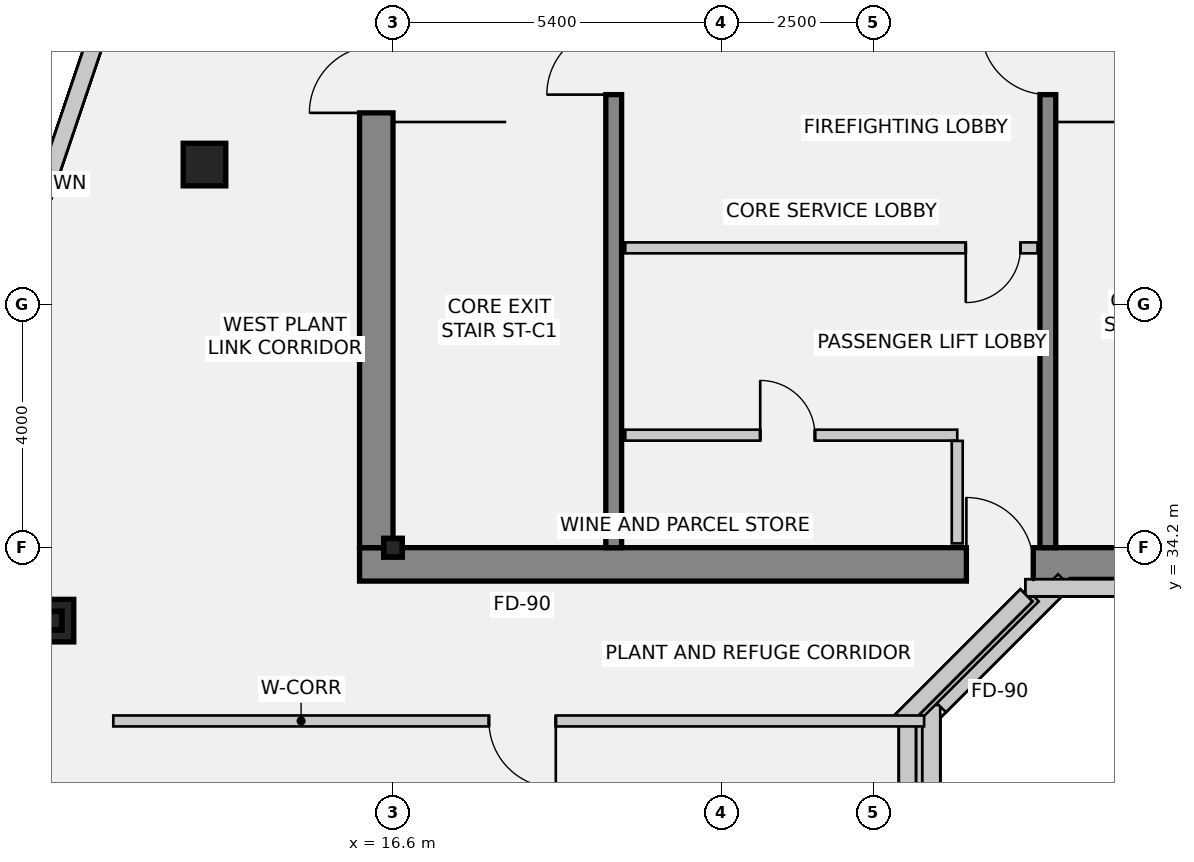
"""IFC4 building model, lengths in metres.
Left out: names, types, materials, properties, quantities, classifications, styles, units other than length and angle.
Written with IfcOpenShell. Run it as: python <this file> out.ifc"""

import sys

from ifc_helpers import new_model, si_unit, direction, frame, frame_2d, origin, origin_2d, place, context, subcontext, project, spatial, rectangle, hollow_rectangle, extrude, source, transform, mapped, element, fill, save


model = new_model("IFC4")
c1 = context("Model", 3, precision=1e-05, world=origin(), true_north=direction((0.0, 1.0)))
c2 = subcontext(c1, "Body", "Model", "MODEL_VIEW")
j1 = project(units=[si_unit("LENGTHUNIT", "METRE"), si_unit("PLANEANGLEUNIT", "RADIAN")], contexts=[c1])
p1 = place(None, origin())
s1 = spatial("IfcSite", under=j1, at=p1, CompositionType="ELEMENT")
p2 = place(p1, origin())
s2 = spatial("IfcBuilding", under=s1, at=p2, CompositionType="ELEMENT")
p3 = place(p2, frame((0.0, 0.0, 309.5)))
s3 = spatial("IfcBuildingStorey", under=s2, at=p3, CompositionType="ELEMENT", Elevation=309.5)
p4 = place(p3, frame((16.05, 33.925, 0.0), z_axis=(0.0, 0.0, 1.0), x_axis=(1.0, 0.0, 0.0)))
e1 = element("IfcWall", 1, at=p4, inside=s3, PredefinedType="SHEAR", context=c2, shape_type="SweptSolid", body=[
    extrude(rectangle(XDim=15.5, YDim=0.55, at=frame_2d((7.75, 0.0))), origin(), (0.0, 0.0, 1.0), 5.4),
])
m1 = source(origin(), c2, "Body", "SweptSolid", [
    extrude(rectangle(XDim=1.1, YDim=2.15, at=frame_2d((0.55, 1.075))), frame((0.0, 0.285, 0.0), z_axis=(0.0, -1.0, 0.0), x_axis=(1.0, 0.0, 0.0)), (0.0, 0.0, 1.0), 0.57),
])
p5 = place(p4, frame((9.98, 0.0, 0.0)))
e2 = element("IfcOpeningElement", 2, at=p5, cuts=e1, PredefinedType="OPENING", context=c2, shape_type="MappedRepresentation", body=[
    mapped(m1, transform((0.0, 0.0, 0.0), scale=1.0)),
])
p6 = place(p3, frame((16.325, 34.2, 0.0), z_axis=(0.0, 0.0, 1.0), x_axis=(0.0, 1.0, 0.0)))
e3 = element("IfcWall", 3, at=p6, inside=s3, PredefinedType="SHEAR", context=c2, shape_type="SweptSolid", body=[
    extrude(rectangle(XDim=11.4, YDim=0.55, at=frame_2d((5.7, 0.0))), origin(), (0.0, 0.0, 1.0), 5.4),
])
p7 = place(p6, frame((7.15, 0.0, 0.0)))
e4 = element("IfcOpeningElement", 4, at=p7, cuts=e3, PredefinedType="OPENING", context=c2, shape_type="MappedRepresentation", body=[
    mapped(m1, transform((0.0, 0.0, 0.0), scale=1.0)),
])
p8 = place(p3, frame((20.23, 34.2, 0.0), z_axis=(0.0, 0.0, 1.0), x_axis=(0.0, 1.0, 0.0)))
e5 = element("IfcWall", 5, at=p8, inside=s3, PredefinedType="SHEAR", context=c2, shape_type="SweptSolid", body=[
    extrude(rectangle(XDim=9.06, YDim=0.26, at=frame_2d((4.53, 0.0))), origin(), (0.0, 0.0, 1.0), 5.4),
])
m2 = source(origin(), c2, "Body", "SweptSolid", [
    extrude(rectangle(XDim=1.1, YDim=2.15, at=frame_2d((0.55, 1.075))), frame((0.0, 0.14, 0.0), z_axis=(0.0, -1.0, 0.0), x_axis=(1.0, 0.0, 0.0)), (0.0, 0.0, 1.0), 0.28),
])
p9 = place(p8, frame((7.45, 0.0, 0.0)))
e6 = element("IfcOpeningElement", 6, at=p9, cuts=e5, PredefinedType="OPENING", context=c2, shape_type="MappedRepresentation", body=[
    mapped(m2, transform((0.0, 0.0, 0.0), scale=1.0)),
])
p10 = place(p3, frame((27.37, 34.2, 0.0), z_axis=(0.0, 0.0, 1.0), x_axis=(0.0, 1.0, 0.0)))
e7 = element("IfcWall", 7, at=p10, inside=s3, PredefinedType="SHEAR", context=c2, shape_type="SweptSolid", body=[
    extrude(rectangle(XDim=9.06, YDim=0.26, at=frame_2d((4.53, 0.0))), origin(), (0.0, 0.0, 1.0), 5.4),
])
p11 = place(p10, frame((7.45, 0.0, 0.0)))
e8 = element("IfcOpeningElement", 8, at=p11, cuts=e7, PredefinedType="OPENING", context=c2, shape_type="MappedRepresentation", body=[
    mapped(m2, transform((0.0, 0.0, 0.0), scale=1.0)),
])
m3 = source(origin(), c2, "Body", "SweptSolid", [
    extrude(rectangle(XDim=0.7, YDim=0.7, at=origin_2d()), origin(), (0.0, 0.0, 1.0), 5.4),
])
for number, where, z_axis, x_axis in (
    (9, (11.0, 33.0, 0.0), (0.0, 0.0, 1.0), (1.0, 0.0, 0.0)),
    (10, (13.5, 40.5, 0.0), (0.0, 0.0, 1.0), (1.0, 0.0, 0.0)),
):
    element("IfcColumn", number, at=place(p3, frame(where, z_axis=z_axis, x_axis=x_axis)), inside=s3, PredefinedType="COLUMN", context=c2, shape_type="MappedRepresentation", body=[
        mapped(m3, transform((0.0, 0.0, 0.0), scale=1.0)),
    ])
m4 = source(origin(), c2, "Body", "SweptSolid", [
    extrude(hollow_rectangle(XDim=0.3, YDim=0.3, WallThickness=0.016, InnerFilletRadius=0.016, OuterFilletRadius=0.032, at=origin_2d()), origin(), (0.0, 0.0, 1.0), 3.684),
])
p12 = place(p3, frame((16.6, 34.2, 5.4), z_axis=(0.0, 0.0, 1.0), x_axis=(1.0, 0.0, 0.0)))
e11 = element("IfcColumn", 11, at=p12, inside=s3, PredefinedType="COLUMN", context=c2, shape_type="MappedRepresentation", body=[
    mapped(m4, transform((0.0, 0.0, 0.0), scale=1.0)),
])
m5 = source(origin(), c2, "Body", "SweptSolid", [
    extrude(hollow_rectangle(XDim=0.3, YDim=0.3, WallThickness=0.016, InnerFilletRadius=0.016, OuterFilletRadius=0.032, at=origin_2d()), origin(), (0.0, 0.0, 1.0), 3.513),
])
p13 = place(p3, frame((11.0, 33.0, 5.4), z_axis=(0.0, 0.0, 1.0), x_axis=(1.0, 0.0, 0.0)))
e12 = element("IfcColumn", 12, at=p13, inside=s3, PredefinedType="COLUMN", context=c2, shape_type="MappedRepresentation", body=[
    mapped(m5, transform((0.0, 0.0, 0.0), scale=1.0)),
])
m6 = source(origin(), c2, "Body", "SweptSolid", [
    extrude(hollow_rectangle(XDim=0.3, YDim=0.3, WallThickness=0.016, InnerFilletRadius=0.016, OuterFilletRadius=0.032, at=origin_2d()), origin(), (0.0, 0.0, 1.0), 4.485),
])
p14 = place(p3, frame((16.6, 34.2, 9.094), z_axis=(0.0, 0.0, 1.0), x_axis=(1.0, 0.0, 0.0)))
e13 = element("IfcColumn", 13, at=p14, inside=s3, PredefinedType="COLUMN", context=c2, shape_type="MappedRepresentation", body=[
    mapped(m6, transform((0.0, 0.0, 0.0), scale=1.0)),
])
m7 = source(origin(), c2, "Body", "SweptSolid", [
    extrude(hollow_rectangle(XDim=0.3, YDim=0.3, WallThickness=0.016, InnerFilletRadius=0.016, OuterFilletRadius=0.032, at=origin_2d()), origin(), (0.0, 0.0, 1.0), 4.481),
])
p15 = place(p3, frame((11.0, 33.0, 8.923), z_axis=(0.0, 0.0, 1.0), x_axis=(1.0, 0.0, 0.0)))
e14 = element("IfcColumn", 14, at=p15, inside=s3, PredefinedType="COLUMN", context=c2, shape_type="MappedRepresentation", body=[
    mapped(m7, transform((0.0, 0.0, 0.0), scale=1.0)),
])
m8 = source(origin(), c2, "Body", "SweptSolid", [
    extrude(hollow_rectangle(XDim=0.3, YDim=0.3, WallThickness=0.016, InnerFilletRadius=0.016, OuterFilletRadius=0.032, at=origin_2d()), origin(), (0.0, 0.0, 1.0), 4.485),
])
p16 = place(p3, frame((16.6, 34.2, 13.588), z_axis=(0.0, 0.0, 1.0), x_axis=(1.0, 0.0, 0.0)))
e15 = element("IfcColumn", 15, at=p16, inside=s3, PredefinedType="COLUMN", context=c2, shape_type="MappedRepresentation", body=[
    mapped(m8, transform((0.0, 0.0, 0.0), scale=1.0)),
])
m9 = source(origin(), c2, "Body", "SweptSolid", [
    extrude(hollow_rectangle(XDim=0.3, YDim=0.3, WallThickness=0.016, InnerFilletRadius=0.016, OuterFilletRadius=0.032, at=origin_2d()), origin(), (0.0, 0.0, 1.0), 4.481),
])
p17 = place(p3, frame((11.0, 33.0, 13.415), z_axis=(0.0, 0.0, 1.0), x_axis=(1.0, 0.0, 0.0)))
e16 = element("IfcColumn", 16, at=p17, inside=s3, PredefinedType="COLUMN", context=c2, shape_type="MappedRepresentation", body=[
    mapped(m9, transform((0.0, 0.0, 0.0), scale=1.0)),
])
m10 = source(origin(), c2, "Body", "SweptSolid", [
    extrude(hollow_rectangle(XDim=0.3, YDim=0.3, WallThickness=0.016, InnerFilletRadius=0.016, OuterFilletRadius=0.032, at=origin_2d()), origin(), (0.0, 0.0, 1.0), 3.865),
])
p18 = place(p3, frame((16.6, 34.2, 18.083), z_axis=(0.0, 0.0, 1.0), x_axis=(1.0, 0.0, 0.0)))
e17 = element("IfcColumn", 17, at=p18, inside=s3, PredefinedType="COLUMN", context=c2, shape_type="MappedRepresentation", body=[
    mapped(m10, transform((0.0, 0.0, 0.0), scale=1.0)),
])
m11 = source(origin(), c2, "Body", "SweptSolid", [
    extrude(hollow_rectangle(XDim=0.3, YDim=0.3, WallThickness=0.016, InnerFilletRadius=0.016, OuterFilletRadius=0.032, at=origin_2d()), origin(), (0.0, 0.0, 1.0), 3.861),
])
p19 = place(p3, frame((11.0, 33.0, 17.906), z_axis=(0.0, 0.0, 1.0), x_axis=(1.0, 0.0, 0.0)))
e18 = element("IfcColumn", 18, at=p19, inside=s3, PredefinedType="COLUMN", context=c2, shape_type="MappedRepresentation", body=[
    mapped(m11, transform((0.0, 0.0, 0.0), scale=1.0)),
])
p20 = place(p3, frame((25.45, 26.457, 0.0), z_axis=(0.0, 0.0, 1.0), x_axis=(0.0, 1.0, 0.0)))
e19 = element("IfcWall", 19, at=p20, inside=s3, PredefinedType="SOLIDWALL", context=c2, shape_type="SweptSolid", body=[
    extrude(rectangle(XDim=5.155, YDim=0.3, at=frame_2d((2.577, 0.0))), origin(), (0.0, 0.0, 1.0), 5.1),
])
p21 = place(p3, frame((25.588, 31.6, 0.0), z_axis=(0.0, 0.0, 1.0), x_axis=(0.707106781187, 0.707106781187, 0.0)))
e20 = element("IfcWall", 20, at=p21, inside=s3, PredefinedType="SOLIDWALL", context=c2, shape_type="SweptSolid", body=[
    extrude(rectangle(XDim=2.907, YDim=0.3, at=frame_2d((1.454, 0.0))), origin(), (0.0, 0.0, 1.0), 5.1),
])
p22 = place(p3, frame((27.733, 33.55, 0.0), z_axis=(0.0, 0.0, 1.0), x_axis=(1.0, 0.0, 0.0)))
e21 = element("IfcWall", 21, at=p22, inside=s3, PredefinedType="SOLIDWALL", context=c2, shape_type="SweptSolid", body=[
    extrude(rectangle(XDim=8.355, YDim=0.3, at=frame_2d((4.177, 0.0))), origin(), (0.0, 0.0, 1.0), 5.1),
])
p23 = place(p3, frame((8.102, 31.864, 5.4), z_axis=(0.0, 0.0, 1.0), x_axis=(0.319909448343, 0.947448122517, 0.0)))
e22 = element("IfcWall", 22, at=p23, inside=s3, PredefinedType="SOLIDWALL", context=c2, shape_type="SweptSolid", body=[
    extrude(rectangle(XDim=16.441, YDim=0.28, at=frame_2d((8.221, 0.0))), origin(), (0.0, 0.0, 1.0), 3.08),
])
p24 = place(p3, frame((35.265, 33.54, 5.4), z_axis=(0.0, 0.0, 1.0), x_axis=(-1.0, 0.0, 0.0)))
e23 = element("IfcWall", 23, at=p24, inside=s3, PredefinedType="SOLIDWALL", context=c2, shape_type="SweptSolid", body=[
    extrude(rectangle(XDim=8.159, YDim=0.28, at=frame_2d((4.08, 0.0))), origin(), (0.0, 0.0, 1.0), 3.08),
])
p25 = place(p3, frame((27.121, 33.415, 5.4), z_axis=(0.0, 0.0, 1.0), x_axis=(-0.707106781187, -0.707106781187, 0.0)))
e24 = element("IfcWall", 24, at=p25, inside=s3, PredefinedType="SOLIDWALL", context=c2, shape_type="SweptSolid", body=[
    extrude(rectangle(XDim=2.908, YDim=0.28, at=frame_2d((1.454, 0.0))), origin(), (0.0, 0.0, 1.0), 3.08),
])
p26 = place(p3, frame((25.164, 31.281, 5.4), z_axis=(0.0, 0.0, 1.0), x_axis=(0.0, -1.0, 0.0)))
e25 = element("IfcWall", 25, at=p26, inside=s3, PredefinedType="SOLIDWALL", context=c2, shape_type="SweptSolid", body=[
    extrude(rectangle(XDim=4.663, YDim=0.28, at=frame_2d((2.332, 0.0))), origin(), (0.0, 0.0, 1.0), 3.08),
])
p27 = place(p3, frame((8.102, 31.865, 8.822), z_axis=(0.0, 0.0, 1.0), x_axis=(0.319909621118, 0.947448064179, 0.0)))
e26 = element("IfcWall", 26, at=p27, inside=s3, PredefinedType="SOLIDWALL", context=c2, shape_type="SweptSolid", body=[
    extrude(rectangle(XDim=16.441, YDim=0.28, at=frame_2d((8.22, 0.0))), origin(), (0.0, 0.0, 1.0), 4.158),
])
p28 = place(p3, frame((34.765, 33.54, 9.338), z_axis=(0.0, 0.0, 1.0), x_axis=(-1.0, 0.0, 0.0)))
e27 = element("IfcWall", 27, at=p28, inside=s3, PredefinedType="SOLIDWALL", context=c2, shape_type="SweptSolid", body=[
    extrude(rectangle(XDim=7.763, YDim=0.28, at=frame_2d((3.882, 0.0))), origin(), (0.0, 0.0, 1.0), 3.642),
])
p29 = place(p3, frame((27.017, 33.415, 9.232), z_axis=(0.0, 0.0, 1.0), x_axis=(-0.707106781187, -0.707106781187, 0.0)))
e28 = element("IfcWall", 28, at=p29, inside=s3, PredefinedType="SOLIDWALL", context=c2, shape_type="SweptSolid", body=[
    extrude(rectangle(XDim=2.908, YDim=0.28, at=frame_2d((1.454, 0.0))), origin(), (0.0, 0.0, 1.0), 3.748),
])
p30 = place(p3, frame((25.06, 31.281, 9.128), z_axis=(0.0, 0.0, 1.0), x_axis=(0.0, -1.0, 0.0)))
e29 = element("IfcWall", 29, at=p30, inside=s3, PredefinedType="SOLIDWALL", context=c2, shape_type="SweptSolid", body=[
    extrude(rectangle(XDim=4.163, YDim=0.28, at=frame_2d((2.082, 0.0))), origin(), (0.0, 0.0, 1.0), 3.852),
])
p31 = place(p3, frame((8.102, 31.865, 13.312), z_axis=(0.0, 0.0, 1.0), x_axis=(0.31990979391, 0.947448005835, 0.0)))
e30 = element("IfcWall", 30, at=p31, inside=s3, PredefinedType="SOLIDWALL", context=c2, shape_type="SweptSolid", body=[
    extrude(rectangle(XDim=16.44, YDim=0.28, at=frame_2d((8.22, 0.0))), origin(), (0.0, 0.0, 1.0), 4.168),
])
p32 = place(p3, frame((34.265, 33.54, 13.838), z_axis=(0.0, 0.0, 1.0), x_axis=(-1.0, 0.0, 0.0)))
e31 = element("IfcWall", 31, at=p32, inside=s3, PredefinedType="SOLIDWALL", context=c2, shape_type="SweptSolid", body=[
    extrude(rectangle(XDim=7.263, YDim=0.28, at=frame_2d((3.632, 0.0))), origin(), (0.0, 0.0, 1.0), 3.642),
])
p33 = place(p3, frame((27.017, 33.415, 13.73), z_axis=(0.0, 0.0, 1.0), x_axis=(-0.707106781187, -0.707106781187, 0.0)))
e32 = element("IfcWall", 32, at=p33, inside=s3, PredefinedType="SOLIDWALL", context=c2, shape_type="SweptSolid", body=[
    extrude(rectangle(XDim=2.908, YDim=0.28, at=frame_2d((1.454, 0.0))), origin(), (0.0, 0.0, 1.0), 3.75),
])
p34 = place(p3, frame((25.06, 31.281, 13.637), z_axis=(0.0, 0.0, 1.0), x_axis=(0.0, -1.0, 0.0)))
e33 = element("IfcWall", 33, at=p34, inside=s3, PredefinedType="SOLIDWALL", context=c2, shape_type="SweptSolid", body=[
    extrude(rectangle(XDim=3.663, YDim=0.28, at=frame_2d((1.832, 0.0))), origin(), (0.0, 0.0, 1.0), 3.843),
])
p35 = place(p3, frame((8.103, 31.866, 17.801), z_axis=(0.0, 0.0, 1.0), x_axis=(0.319914468152, 0.947446427545, 0.0)))
e34 = element("IfcWall", 34, at=p35, inside=s3, PredefinedType="SOLIDWALL", context=c2, shape_type="SweptSolid", body=[
    extrude(rectangle(XDim=16.439, YDim=0.28, at=frame_2d((8.219, 0.0))), origin(), (0.0, 0.0, 1.0), 3.56),
])
p36 = place(p3, frame((33.765, 33.54, 18.337), z_axis=(0.0, 0.0, 1.0), x_axis=(-1.0, 0.0, 0.0)))
e35 = element("IfcWall", 35, at=p36, inside=s3, PredefinedType="SOLIDWALL", context=c2, shape_type="SweptSolid", body=[
    extrude(rectangle(XDim=6.763, YDim=0.28, at=frame_2d((3.382, 0.0))), origin(), (0.0, 0.0, 1.0), 3.023),
])
p37 = place(p3, frame((27.017, 33.415, 18.227), z_axis=(0.0, 0.0, 1.0), x_axis=(-0.707106781187, -0.707106781187, 0.0)))
e36 = element("IfcWall", 36, at=p37, inside=s3, PredefinedType="SOLIDWALL", context=c2, shape_type="SweptSolid", body=[
    extrude(rectangle(XDim=2.908, YDim=0.28, at=frame_2d((1.454, 0.0))), origin(), (0.0, 0.0, 1.0), 3.133),
])
p38 = place(p3, frame((25.06, 31.281, 18.145), z_axis=(0.0, 0.0, 1.0), x_axis=(0.0, -1.0, 0.0)))
e37 = element("IfcWall", 37, at=p38, inside=s3, PredefinedType="SOLIDWALL", context=c2, shape_type="SweptSolid", body=[
    extrude(rectangle(XDim=3.163, YDim=0.28, at=frame_2d((1.582, 0.0))), origin(), (0.0, 0.0, 1.0), 3.215),
])
p39 = place(p3, frame((27.2, 39.13, 0.0), z_axis=(0.0, 0.0, 1.0), x_axis=(-1.0, 0.0, 0.0)))
e38 = element("IfcWall", 38, at=p39, inside=s3, PredefinedType="PARTITIONING", context=c2, shape_type="SweptSolid", body=[
    extrude(rectangle(XDim=6.78, YDim=0.18, at=frame_2d((3.39, 0.0))), origin(), (0.0, 0.0, 1.0), 5.1),
])
m12 = source(origin(), c2, "Body", "SweptSolid", [
    extrude(rectangle(XDim=0.9, YDim=2.15, at=frame_2d((0.45, 1.075))), frame((0.0, 0.1, 0.0), z_axis=(0.0, -1.0, 0.0), x_axis=(1.0, 0.0, 0.0)), (0.0, 0.0, 1.0), 0.2),
])
p40 = place(p39, frame((0.28, 0.0, 0.0)))
e39 = element("IfcOpeningElement", 39, at=p40, cuts=e38, PredefinedType="OPENING", context=c2, shape_type="MappedRepresentation", body=[
    mapped(m12, transform((0.0, 0.0, 0.0), scale=1.0)),
])
p41 = place(p3, frame((20.42, 36.05, 0.0), z_axis=(0.0, 0.0, 1.0), x_axis=(1.0, 0.0, 0.0)))
e40 = element("IfcWall", 40, at=p41, inside=s3, PredefinedType="PARTITIONING", context=c2, shape_type="SweptSolid", body=[
    extrude(rectangle(XDim=5.46, YDim=0.18, at=frame_2d((2.73, 0.0))), origin(), (0.0, 0.0, 1.0), 5.1),
])
p42 = place(p41, frame((2.219, 0.0, 0.0)))
e41 = element("IfcOpeningElement", 41, at=p42, cuts=e40, PredefinedType="OPENING", context=c2, shape_type="MappedRepresentation", body=[
    mapped(m12, transform((0.0, 0.0, 0.0), scale=1.0)),
])
p43 = place(p3, frame((25.88, 35.956, 0.0), z_axis=(0.0, 0.0, 1.0), x_axis=(0.0, -1.0, 0.0)))
e42 = element("IfcWall", 42, at=p43, inside=s3, PredefinedType="PARTITIONING", context=c2, shape_type="SweptSolid", body=[
    extrude(rectangle(XDim=1.686, YDim=0.18, at=frame_2d((0.843, 0.0))), origin(), (0.0, 0.0, 1.0), 4.392),
])
p44 = place(p3, frame((25.335, 31.35, 0.0), z_axis=(0.0, 0.0, 1.0), x_axis=(-1.0, 0.0, 0.0)))
e43 = element("IfcWall", 43, at=p44, inside=s3, PredefinedType="PARTITIONING", context=c2, shape_type="SweptSolid", body=[
    extrude(rectangle(XDim=13.335, YDim=0.18, at=frame_2d((6.667, 0.0))), origin(), (0.0, 0.0, 1.0), 4.769),
])
m13 = source(origin(), c2, "Body", "SweptSolid", [
    extrude(rectangle(XDim=1.1, YDim=2.15, at=frame_2d((0.55, 1.075))), frame((0.0, 0.1, 0.0), z_axis=(0.0, -1.0, 0.0), x_axis=(1.0, 0.0, 0.0)), (0.0, 0.0, 1.0), 0.2),
])
p45 = place(p44, frame((6.057, 0.0, 0.0)))
e44 = element("IfcOpeningElement", 44, at=p45, cuts=e43, PredefinedType="OPENING", context=c2, shape_type="MappedRepresentation", body=[
    mapped(m13, transform((0.0, 0.0, 0.0), scale=1.0)),
])
p46 = place(p3, frame((0.0, 0.0, 5.1)))
p47 = place(p46, frame((21.6, 35.4, 0.0)))
p48 = place(p47, frame((0.0, 0.0, 0.25)))
e45 = element("IfcDoor", 45, at=p48, inside=s3, OperationType="SINGLE_SWING_LEFT", PredefinedType="TRAPDOOR", context=c2, shape_type="SweptSolid", body=[
    extrude(rectangle(XDim=1.1, YDim=1.1, at=origin_2d()), origin(), (0.0, 0.0, 1.0), 0.05),
])
p49 = place(p46, frame((23.0, 35.4, 0.0)))
p50 = place(p49, frame((0.0, 0.0, 0.25)))
e46 = element("IfcDoor", 46, at=p50, inside=s3, OperationType="SINGLE_SWING_LEFT", PredefinedType="TRAPDOOR", context=c2, shape_type="SweptSolid", body=[
    extrude(rectangle(XDim=1.1, YDim=1.1, at=origin_2d()), origin(), (0.0, 0.0, 1.0), 0.05),
])
p51 = place(p46, frame((24.4, 35.4, 0.0)))
p52 = place(p51, frame((0.0, 0.0, 0.25)))
e47 = element("IfcDoor", 47, at=p52, inside=s3, OperationType="SINGLE_SWING_LEFT", PredefinedType="TRAPDOOR", context=c2, shape_type="SweptSolid", body=[
    extrude(rectangle(XDim=1.1, YDim=1.1, at=origin_2d()), origin(), (0.0, 0.0, 1.0), 0.05),
])
p53 = place(p46, frame((25.8, 35.4, 0.0)))
p54 = place(p53, frame((0.0, 0.0, 0.25)))
e48 = element("IfcDoor", 48, at=p54, inside=s3, OperationType="SINGLE_SWING_LEFT", PredefinedType="TRAPDOOR", context=c2, shape_type="SweptSolid", body=[
    extrude(rectangle(XDim=1.1, YDim=1.1, at=origin_2d()), origin(), (0.0, 0.0, 1.0), 0.05),
])
p55 = place(p46, frame((22.0, 40.2, 0.0)))
p56 = place(p55, frame((0.0, 0.0, 0.25)))
e49 = element("IfcWindow", 49, at=p56, inside=s3, PartitioningType="SINGLE_PANEL", PredefinedType="SKYLIGHT", context=c2, shape_type="SweptSolid", body=[
    extrude(rectangle(XDim=2.2, YDim=2.2, at=origin_2d()), origin(), (0.0, 0.0, 1.0), 0.05),
])
p57 = place(p46, frame((25.0, 40.2, 0.0)))
p58 = place(p57, frame((0.0, 0.0, 0.25)))
e50 = element("IfcWindow", 50, at=p58, inside=s3, PartitioningType="SINGLE_PANEL", PredefinedType="SKYLIGHT", context=c2, shape_type="SweptSolid", body=[
    extrude(rectangle(XDim=2.2, YDim=2.2, at=origin_2d()), origin(), (0.0, 0.0, 1.0), 0.05),
])
p59 = place(p46, frame((28.6, 40.2, 0.0)))
p60 = place(p59, frame((0.0, 0.0, 0.25)))
e51 = element("IfcWindow", 51, at=p60, inside=s3, PartitioningType="SINGLE_PANEL", PredefinedType="LIGHTDOME", context=c2, shape_type="SweptSolid", body=[
    extrude(rectangle(XDim=2.2, YDim=2.2, at=origin_2d()), origin(), (0.0, 0.0, 1.0), 0.05),
])
m14 = source(origin(), c2, "Body", "SweptSolid", [
    extrude(rectangle(XDim=1.1, YDim=2.15, at=frame_2d((0.55, 1.075))), frame((0.0, 0.025, 0.0), z_axis=(0.0, -1.0, 0.0), x_axis=(1.0, 0.0, 0.0)), (0.0, 0.0, 1.0), 0.05),
])
p61 = place(p9, origin())
e52 = element("IfcDoor", 52, at=p61, inside=s3, OperationType="SINGLE_SWING_LEFT", PredefinedType="DOOR", context=c2, shape_type="MappedRepresentation", body=[
    mapped(m14, transform((0.0, 0.0, 0.0), scale=1.0)),
])
fill(e6, e52)
p62 = place(p11, origin())
e53 = element("IfcDoor", 53, at=p62, inside=s3, OperationType="SINGLE_SWING_RIGHT", PredefinedType="DOOR", context=c2, shape_type="MappedRepresentation", body=[
    mapped(m14, transform((0.0, 0.0, 0.0), scale=1.0)),
])
fill(e8, e53)
p63 = place(p7, origin())
e54 = element("IfcDoor", 54, at=p63, inside=s3, OperationType="SINGLE_SWING_LEFT", PredefinedType="DOOR", context=c2, shape_type="MappedRepresentation", body=[
    mapped(m14, transform((0.0, 0.0, 0.0), scale=1.0)),
])
fill(e4, e54)
p64 = place(p5, origin())
e55 = element("IfcDoor", 55, at=p64, inside=s3, OperationType="SINGLE_SWING_LEFT", PredefinedType="DOOR", context=c2, shape_type="MappedRepresentation", body=[
    mapped(m14, transform((0.0, 0.0, 0.0), scale=1.0)),
])
fill(e2, e55)
m15 = source(origin(), c2, "Body", "SweptSolid", [
    extrude(rectangle(XDim=0.9, YDim=2.15, at=frame_2d((0.45, 1.075))), frame((0.0, 0.025, 0.0), z_axis=(0.0, -1.0, 0.0), x_axis=(1.0, 0.0, 0.0)), (0.0, 0.0, 1.0), 0.05),
])
p65 = place(p40, origin())
e56 = element("IfcDoor", 56, at=p65, inside=s3, OperationType="SINGLE_SWING_RIGHT", PredefinedType="DOOR", context=c2, shape_type="MappedRepresentation", body=[
    mapped(m15, transform((0.0, 0.0, 0.0), scale=1.0)),
])
fill(e39, e56)
p66 = place(p42, origin())
e57 = element("IfcDoor", 57, at=p66, inside=s3, OperationType="SINGLE_SWING_LEFT", PredefinedType="DOOR", context=c2, shape_type="MappedRepresentation", body=[
    mapped(m15, transform((0.0, 0.0, 0.0), scale=1.0)),
])
fill(e41, e57)
p67 = place(p45, origin())
e58 = element("IfcDoor", 58, at=p67, inside=s3, OperationType="SINGLE_SWING_LEFT", PredefinedType="DOOR", context=c2, shape_type="MappedRepresentation", body=[
    mapped(m14, transform((0.0, 0.0, 0.0), scale=1.0)),
])
fill(e44, e58)
save(model, sys.argv[1])
